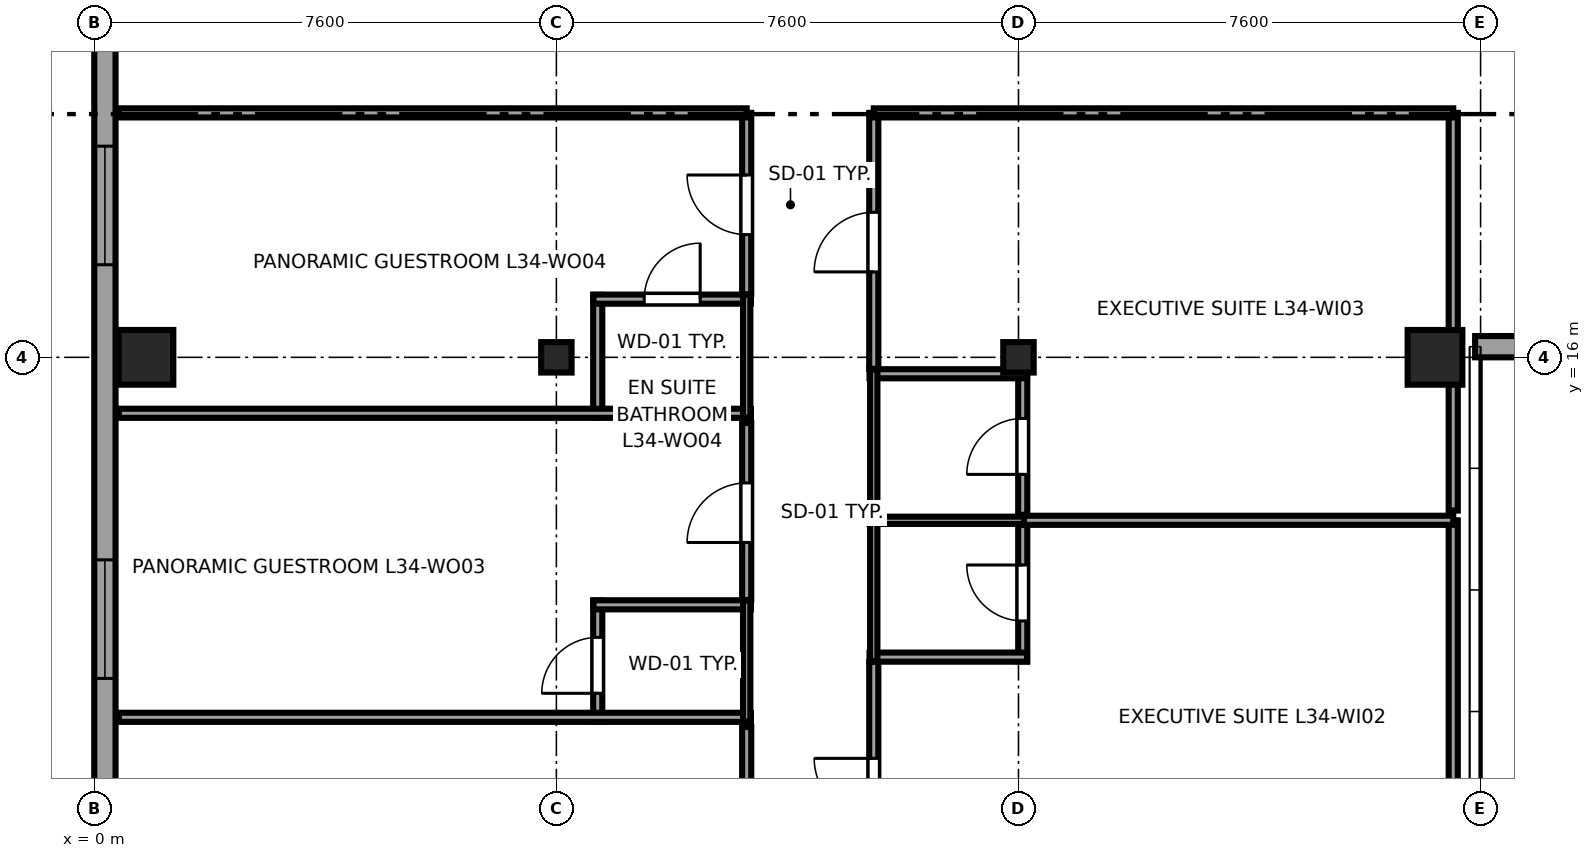
"""IFC4 building model, lengths in metres.
Left out: names, types, materials, properties, quantities, classifications, styles, units other than length and angle.
Written with IfcOpenShell. Run it as: python <this file> out.ifc"""

import sys

from ifc_helpers import new_model, si_unit, direction, frame, frame_2d, origin, origin_2d, place, context, subcontext, project, spatial, rectangle, i_section, extrude, source, transform, mapped, element, fill, save


model = new_model("IFC4")
c1 = context("Model", 3, precision=1e-05, world=origin(), true_north=direction((0.0, 1.0)))
c2 = subcontext(c1, "Body", "Model", "MODEL_VIEW")
j1 = project(units=[si_unit("LENGTHUNIT", "METRE"), si_unit("PLANEANGLEUNIT", "RADIAN")], contexts=[c1])
p1 = place(None, origin())
s1 = spatial("IfcSite", under=j1, at=p1, CompositionType="ELEMENT")
p2 = place(p1, origin())
s2 = spatial("IfcBuilding", under=s1, at=p2, CompositionType="ELEMENT")
p3 = place(p2, frame((0.0, 0.0, 132.85)))
s3 = spatial("IfcBuildingStorey", under=s2, at=p3, CompositionType="ELEMENT", Elevation=132.85)
m1 = source(origin(), c2, "Body", "SweptSolid", [
    extrude(rectangle(XDim=0.9, YDim=0.9, at=origin_2d()), origin(), (0.0, 0.0, 1.0), 3.55),
])
p4 = place(p3, frame((0.85, 16.0, 0.0), z_axis=(0.0, 0.0, 1.0), x_axis=(1.0, 0.0, 0.0)))
e1 = element("IfcColumn", 1, at=p4, inside=s3, PredefinedType="COLUMN", context=c2, shape_type="MappedRepresentation", body=[
    mapped(m1, transform((0.0, 0.0, 0.0), x_axis=(1.0, 0.0, 0.0), y_axis=(0.0, 1.0, 0.0), z_axis=(0.0, 0.0, 1.0), scale=1.0)),
])
m2 = source(origin(), c2, "Body", "SweptSolid", [
    extrude(i_section(OverallWidth=0.5, OverallDepth=0.5, WebThickness=0.022, FlangeThickness=0.034, at=origin_2d()), origin(), (0.0, 0.0, 1.0), 3.55),
])
for number, where, z_axis, x_axis in (
    (2, (7.6, 16.0, 0.0), (0.0, 0.0, 1.0), (1.0, 0.0, 0.0)),
    (3, (15.2, 16.0, 0.0), (0.0, 0.0, 1.0), (1.0, 0.0, 0.0)),
):
    element("IfcColumn", number, at=place(p3, frame(where, z_axis=z_axis, x_axis=x_axis)), inside=s3, PredefinedType="COLUMN", context=c2, shape_type="MappedRepresentation", body=[
        mapped(m2, transform((0.0, 0.0, 0.0), x_axis=(1.0, 0.0, 0.0), y_axis=(0.0, 1.0, 0.0), z_axis=(0.0, 0.0, 1.0), scale=1.0)),
    ])
p5 = place(p3, frame((22.05, 16.0, 0.0), z_axis=(0.0, 0.0, 1.0), x_axis=(1.0, 0.0, 0.0)))
e4 = element("IfcColumn", 4, at=p5, inside=s3, PredefinedType="COLUMN", context=c2, shape_type="MappedRepresentation", body=[
    mapped(m1, transform((0.0, 0.0, 0.0), x_axis=(1.0, 0.0, 0.0), y_axis=(0.0, 1.0, 0.0), z_axis=(0.0, 0.0, 1.0), scale=1.0)),
])
p6 = place(p3, frame((22.71, 16.175, 0.0), z_axis=(0.0, 0.0, 1.0), x_axis=(1.0, 0.0, 0.0)))
e5 = element("IfcWall", 5, at=p6, inside=s3, PredefinedType="SOLIDWALL", context=c2, shape_type="SweptSolid", body=[
    extrude(rectangle(XDim=11.58, YDim=0.35, at=frame_2d((5.79, 0.0))), origin(), (0.0, 0.0, 1.0), 2.748),
])
p7 = place(p6, frame((2.22, 0.0, 0.68)))
e6 = element("IfcOpeningElement", 6, at=p7, cuts=e5, PredefinedType="OPENING", context=c2, shape_type="SweptSolid", body=[
    extrude(rectangle(XDim=1.95, YDim=1.82, at=frame_2d((0.975, 0.91))), frame((0.0, 0.185, 0.0), z_axis=(0.0, -1.0, 0.0), x_axis=(1.0, 0.0, 0.0)), (0.0, 0.0, 1.0), 0.37),
])
p8 = place(p6, frame((7.41, 0.0, 0.68)))
e7 = element("IfcOpeningElement", 7, at=p8, cuts=e5, PredefinedType="OPENING", context=c2, shape_type="SweptSolid", body=[
    extrude(rectangle(XDim=1.95, YDim=1.82, at=frame_2d((0.975, 0.91))), frame((0.0, 0.185, 0.0), z_axis=(0.0, -1.0, 0.0), x_axis=(1.0, 0.0, 0.0)), (0.0, 0.0, 1.0), 0.37),
])
p9 = place(p3, frame((0.175, 41.383, 0.0), z_axis=(0.0, 0.0, 1.0), x_axis=(0.0, -1.0, 0.0)))
e8 = element("IfcWall", 8, at=p9, inside=s3, PredefinedType="SOLIDWALL", context=c2, shape_type="SweptSolid", body=[
    extrude(rectangle(XDim=36.766, YDim=0.35, at=frame_2d((18.383, 0.0))), origin(), (0.0, 0.0, 1.0), 3.37),
])
p10 = place(p9, frame((0.551, 0.0, 0.68)))
e9 = element("IfcOpeningElement", 9, at=p10, cuts=e8, PredefinedType="OPENING", context=c2, shape_type="SweptSolid", body=[
    extrude(rectangle(XDim=1.95, YDim=1.82, at=frame_2d((0.975, 0.91))), frame((0.0, 0.185, 0.0), z_axis=(0.0, -1.0, 0.0), x_axis=(1.0, 0.0, 0.0)), (0.0, 0.0, 1.0), 0.37),
])
p11 = place(p9, frame((9.504, 0.0, 0.68)))
e10 = element("IfcOpeningElement", 10, at=p11, cuts=e8, PredefinedType="OPENING", context=c2, shape_type="SweptSolid", body=[
    extrude(rectangle(XDim=1.95, YDim=1.82, at=frame_2d((0.975, 0.91))), frame((0.0, 0.185, 0.0), z_axis=(0.0, -1.0, 0.0), x_axis=(1.0, 0.0, 0.0)), (0.0, 0.0, 1.0), 0.37),
])
p12 = place(p9, frame((13.456, 0.0, 0.68)))
e11 = element("IfcOpeningElement", 11, at=p12, cuts=e8, PredefinedType="OPENING", context=c2, shape_type="SweptSolid", body=[
    extrude(rectangle(XDim=1.95, YDim=1.82, at=frame_2d((0.975, 0.91))), frame((0.0, 0.185, 0.0), z_axis=(0.0, -1.0, 0.0), x_axis=(1.0, 0.0, 0.0)), (0.0, 0.0, 1.0), 0.37),
])
p13 = place(p9, frame((21.91, 0.0, 0.68)))
e12 = element("IfcOpeningElement", 12, at=p13, cuts=e8, PredefinedType="OPENING", context=c2, shape_type="SweptSolid", body=[
    extrude(rectangle(XDim=1.95, YDim=1.82, at=frame_2d((0.975, 0.91))), frame((0.0, 0.185, 0.0), z_axis=(0.0, -1.0, 0.0), x_axis=(1.0, 0.0, 0.0)), (0.0, 0.0, 1.0), 0.37),
])
p14 = place(p9, frame((28.713, 0.0, 0.68)))
e13 = element("IfcOpeningElement", 13, at=p14, cuts=e8, PredefinedType="OPENING", context=c2, shape_type="SweptSolid", body=[
    extrude(rectangle(XDim=1.95, YDim=1.82, at=frame_2d((0.975, 0.91))), frame((0.0, 0.185, 0.0), z_axis=(0.0, -1.0, 0.0), x_axis=(1.0, 0.0, 0.0)), (0.0, 0.0, 1.0), 0.37),
])
p15 = place(p9, frame((33.183, 0.0, 0.62)))
e14 = element("IfcOpeningElement", 14, at=p15, cuts=e8, PredefinedType="OPENING", context=c2, shape_type="SweptSolid", body=[
    extrude(rectangle(XDim=1.5, YDim=1.55, at=frame_2d((0.75, 0.775))), frame((0.0, 0.185, 0.0), z_axis=(0.0, -1.0, 0.0), x_axis=(1.0, 0.0, 0.0)), (0.0, 0.0, 1.0), 0.37),
])
p16 = place(p3, frame((8.28, 10.01, 0.0), z_axis=(0.0, 0.0, 1.0), x_axis=(0.0, 1.0, 0.0)))
e15 = element("IfcWall", 15, at=p16, inside=s3, PredefinedType="PARTITIONING", context=c2, shape_type="SweptSolid", body=[
    extrude(rectangle(XDim=1.99, YDim=0.15, at=frame_2d((0.995, 0.0))), origin(), (0.0, 0.0, 1.0), 3.37),
])
p17 = place(p16, frame((0.465, 0.0, 0.0)))
e16 = element("IfcOpeningElement", 16, at=p17, cuts=e15, PredefinedType="OPENING", context=c2, shape_type="SweptSolid", body=[
    extrude(rectangle(XDim=0.92, YDim=2.01, at=frame_2d((0.46, 1.005))), frame((0.0, 0.085, 0.0), z_axis=(0.0, -1.0, 0.0), x_axis=(1.0, 0.0, 0.0)), (0.0, 0.0, 1.0), 0.17),
])
p18 = place(p3, frame((0.405, 10.08, 0.0), z_axis=(0.0, 0.0, 1.0), x_axis=(1.0, 0.0, 0.0)))
e17 = element("IfcWall", 17, at=p18, inside=s3, PredefinedType="PARTITIONING", context=c2, shape_type="SweptSolid", body=[
    extrude(rectangle(XDim=10.395, YDim=0.15, at=frame_2d((5.198, 0.0))), origin(), (0.0, 0.0, 1.0), 3.37),
])
p19 = place(p3, frame((8.21, 11.93, 0.0), z_axis=(0.0, 0.0, 1.0), x_axis=(1.0, 0.0, 0.0)))
e18 = element("IfcWall", 18, at=p19, inside=s3, PredefinedType="PARTITIONING", context=c2, shape_type="SweptSolid", body=[
    extrude(rectangle(XDim=2.59, YDim=0.15, at=frame_2d((1.295, 0.0))), origin(), (0.0, 0.0, 1.0), 3.37),
])
p20 = place(p3, frame((10.73, 10.01, 0.0), z_axis=(0.0, 0.0, 1.0), x_axis=(0.0, 1.0, 0.0)))
e19 = element("IfcWall", 19, at=p20, inside=s3, PredefinedType="PLUMBINGWALL", context=c2, shape_type="SweptSolid", body=[
    extrude(rectangle(XDim=1.99, YDim=0.12, at=frame_2d((0.995, 0.0))), origin(), (0.0, 0.0, 1.0), 3.37),
])
p21 = place(p3, frame((8.28, 15.01, 0.0), z_axis=(0.0, 0.0, 1.0), x_axis=(0.0, 1.0, 0.0)))
e20 = element("IfcWall", 20, at=p21, inside=s3, PredefinedType="PARTITIONING", context=c2, shape_type="SweptSolid", body=[
    extrude(rectangle(XDim=2.017, YDim=0.15, at=frame_2d((1.009, 0.0))), origin(), (0.0, 0.0, 1.0), 3.37),
])
p22 = place(p3, frame((0.405, 15.08, 0.0), z_axis=(0.0, 0.0, 1.0), x_axis=(1.0, 0.0, 0.0)))
e21 = element("IfcWall", 21, at=p22, inside=s3, PredefinedType="PARTITIONING", context=c2, shape_type="SweptSolid", body=[
    extrude(rectangle(XDim=10.395, YDim=0.15, at=frame_2d((5.198, 0.0))), origin(), (0.0, 0.0, 1.0), 3.37),
])
p23 = place(p3, frame((8.21, 16.957, 0.0), z_axis=(0.0, 0.0, 1.0), x_axis=(1.0, 0.0, 0.0)))
e22 = element("IfcWall", 22, at=p23, inside=s3, PredefinedType="PARTITIONING", context=c2, shape_type="SweptSolid", body=[
    extrude(rectangle(XDim=2.59, YDim=0.15, at=frame_2d((1.295, 0.0))), origin(), (0.0, 0.0, 1.0), 3.37),
])
p24 = place(p23, frame((0.835, 0.0, 0.0)))
e23 = element("IfcOpeningElement", 23, at=p24, cuts=e22, PredefinedType="OPENING", context=c2, shape_type="SweptSolid", body=[
    extrude(rectangle(XDim=0.92, YDim=2.01, at=frame_2d((0.46, 1.005))), frame((0.0, 0.085, 0.0), z_axis=(0.0, -1.0, 0.0), x_axis=(1.0, 0.0, 0.0)), (0.0, 0.0, 1.0), 0.17),
])
p25 = place(p3, frame((10.73, 15.01, 0.0), z_axis=(0.0, 0.0, 1.0), x_axis=(0.0, 1.0, 0.0)))
e24 = element("IfcWall", 24, at=p25, inside=s3, PredefinedType="PLUMBINGWALL", context=c2, shape_type="SweptSolid", body=[
    extrude(rectangle(XDim=2.017, YDim=0.12, at=frame_2d((1.009, 0.0))), origin(), (0.0, 0.0, 1.0), 3.37),
])
p26 = place(p3, frame((15.27, 11.0, 0.0), z_axis=(0.0, 0.0, 1.0), x_axis=(0.0, 1.0, 0.0)))
e25 = element("IfcWall", 25, at=p26, inside=s3, PredefinedType="PARTITIONING", context=c2, shape_type="SweptSolid", body=[
    extrude(rectangle(XDim=2.39, YDim=0.15, at=frame_2d((1.195, 0.0))), origin(), (0.0, 0.0, 1.0), 2.827),
])
p27 = place(p26, frame((0.665, 0.0, 0.0)))
e26 = element("IfcOpeningElement", 26, at=p27, cuts=e25, PredefinedType="OPENING", context=c2, shape_type="SweptSolid", body=[
    extrude(rectangle(XDim=0.92, YDim=2.01, at=frame_2d((0.46, 1.005))), frame((0.0, 0.085, 0.0), z_axis=(0.0, -1.0, 0.0), x_axis=(1.0, 0.0, 0.0)), (0.0, 0.0, 1.0), 0.17),
])
p28 = place(p3, frame((12.75, 11.07, 0.0), z_axis=(0.0, 0.0, 1.0), x_axis=(1.0, 0.0, 0.0)))
e27 = element("IfcWall", 27, at=p28, inside=s3, PredefinedType="PARTITIONING", context=c2, shape_type="SweptSolid", body=[
    extrude(rectangle(XDim=2.59, YDim=0.15, at=frame_2d((1.295, 0.0))), origin(), (0.0, 0.0, 1.0), 3.37),
])
p29 = place(p3, frame((12.75, 13.32, 0.0), z_axis=(0.0, 0.0, 1.0), x_axis=(1.0, 0.0, 0.0)))
e28 = element("IfcWall", 28, at=p29, inside=s3, PredefinedType="PLUMBINGWALL", context=c2, shape_type="SweptSolid", body=[
    extrude(rectangle(XDim=2.59, YDim=0.12, at=frame_2d((1.295, 0.0))), origin(), (0.0, 0.0, 1.0), 3.37),
])
p30 = place(p3, frame((12.82, 11.0, 0.0), z_axis=(0.0, 0.0, 1.0), x_axis=(0.0, 1.0, 0.0)))
e29 = element("IfcWall", 29, at=p30, inside=s3, PredefinedType="PLUMBINGWALL", context=c2, shape_type="SweptSolid", body=[
    extrude(rectangle(XDim=2.39, YDim=0.12, at=frame_2d((1.195, 0.0))), origin(), (0.0, 0.0, 1.0), 3.37),
])
p31 = place(p3, frame((15.27, 13.41, 0.0), z_axis=(0.0, 0.0, 1.0), x_axis=(0.0, 1.0, 0.0)))
e30 = element("IfcWall", 30, at=p31, inside=s3, PredefinedType="PARTITIONING", context=c2, shape_type="SweptSolid", body=[
    extrude(rectangle(XDim=2.39, YDim=0.15, at=frame_2d((1.195, 0.0))), origin(), (0.0, 0.0, 1.0), 2.827),
])
p32 = place(p31, frame((0.665, 0.0, 0.0)))
e31 = element("IfcOpeningElement", 31, at=p32, cuts=e30, PredefinedType="OPENING", context=c2, shape_type="SweptSolid", body=[
    extrude(rectangle(XDim=0.92, YDim=2.01, at=frame_2d((0.46, 1.005))), frame((0.0, 0.085, 0.0), z_axis=(0.0, -1.0, 0.0), x_axis=(1.0, 0.0, 0.0)), (0.0, 0.0, 1.0), 0.17),
])
p33 = place(p3, frame((12.75, 15.73, 0.0), z_axis=(0.0, 0.0, 1.0), x_axis=(1.0, 0.0, 0.0)))
e32 = element("IfcWall", 32, at=p33, inside=s3, PredefinedType="PARTITIONING", context=c2, shape_type="SweptSolid", body=[
    extrude(rectangle(XDim=2.59, YDim=0.15, at=frame_2d((1.295, 0.0))), origin(), (0.0, 0.0, 1.0), 3.37),
])
p34 = place(p3, frame((12.82, 13.41, 0.0), z_axis=(0.0, 0.0, 1.0), x_axis=(0.0, 1.0, 0.0)))
e33 = element("IfcWall", 33, at=p34, inside=s3, PredefinedType="PLUMBINGWALL", context=c2, shape_type="SweptSolid", body=[
    extrude(rectangle(XDim=2.39, YDim=0.12, at=frame_2d((1.195, 0.0))), origin(), (0.0, 0.0, 1.0), 3.37),
])
p35 = place(p3, frame((10.73, 6.937, 0.0), z_axis=(0.0, 0.0, 1.0), x_axis=(0.0, 1.0, 0.0)))
e34 = element("IfcWall", 34, at=p35, inside=s3, PredefinedType="PARTITIONING", context=c2, shape_type="SweptSolid", body=[
    extrude(rectangle(XDim=2.983, YDim=0.15, at=frame_2d((1.491, 0.0))), origin(), (0.0, 0.0, 1.0), 3.37),
])
p36 = place(p35, frame((0.981, 0.0, 0.0)))
e35 = element("IfcOpeningElement", 35, at=p36, cuts=e34, PredefinedType="OPENING", context=c2, shape_type="SweptSolid", body=[
    extrude(rectangle(XDim=0.98, YDim=2.12, at=frame_2d((0.49, 1.06))), frame((0.0, 0.085, 0.0), z_axis=(0.0, -1.0, 0.0), x_axis=(1.0, 0.0, 0.0)), (0.0, 0.0, 1.0), 0.17),
])
p37 = place(p3, frame((10.73, 12.01, 0.0), z_axis=(0.0, 0.0, 1.0), x_axis=(0.0, 1.0, 0.0)))
e36 = element("IfcWall", 36, at=p37, inside=s3, PredefinedType="PARTITIONING", context=c2, shape_type="SweptSolid", body=[
    extrude(rectangle(XDim=2.91, YDim=0.15, at=frame_2d((1.455, 0.0))), origin(), (0.0, 0.0, 1.0), 3.37),
])
p38 = place(p37, frame((0.945, 0.0, 0.0)))
e37 = element("IfcOpeningElement", 37, at=p38, cuts=e36, PredefinedType="OPENING", context=c2, shape_type="SweptSolid", body=[
    extrude(rectangle(XDim=0.98, YDim=2.12, at=frame_2d((0.49, 1.06))), frame((0.0, 0.085, 0.0), z_axis=(0.0, -1.0, 0.0), x_axis=(1.0, 0.0, 0.0)), (0.0, 0.0, 1.0), 0.17),
])
p39 = place(p3, frame((10.73, 17.037, 0.0), z_axis=(0.0, 0.0, 1.0), x_axis=(0.0, 1.0, 0.0)))
e38 = element("IfcWall", 38, at=p39, inside=s3, PredefinedType="PARTITIONING", context=c2, shape_type="SweptSolid", body=[
    extrude(rectangle(XDim=2.983, YDim=0.15, at=frame_2d((1.491, 0.0))), origin(), (0.0, 0.0, 1.0), 3.37),
])
p40 = place(p39, frame((0.981, 0.0, 0.0)))
e39 = element("IfcOpeningElement", 39, at=p40, cuts=e38, PredefinedType="OPENING", context=c2, shape_type="SweptSolid", body=[
    extrude(rectangle(XDim=0.98, YDim=2.12, at=frame_2d((0.49, 1.06))), frame((0.0, 0.085, 0.0), z_axis=(0.0, -1.0, 0.0), x_axis=(1.0, 0.0, 0.0)), (0.0, 0.0, 1.0), 0.17),
])
p41 = place(p3, frame((0.405, 20.02, 0.0), z_axis=(0.0, 0.0, 1.0), x_axis=(1.0, 0.0, 0.0)))
e40 = element("IfcWall", 40, at=p41, inside=s3, PredefinedType="PARTITIONING", context=c2, shape_type="SweptSolid", body=[
    extrude(rectangle(XDim=10.325, YDim=0.15, at=frame_2d((5.163, 0.0))), origin(), (0.0, 0.0, 1.0), 3.37),
])
p42 = place(p3, frame((12.82, 6.88, 0.0), z_axis=(0.0, 0.0, 1.0), x_axis=(0.0, 1.0, 0.0)))
e41 = element("IfcWall", 41, at=p42, inside=s3, PredefinedType="PARTITIONING", context=c2, shape_type="SweptSolid", body=[
    extrude(rectangle(XDim=4.11, YDim=0.15, at=frame_2d((2.055, 0.0))), origin(), (0.0, 0.0, 1.0), 3.37),
])
p43 = place(p42, frame((1.545, 0.0, 0.0)))
e42 = element("IfcOpeningElement", 42, at=p43, cuts=e41, PredefinedType="OPENING", context=c2, shape_type="SweptSolid", body=[
    extrude(rectangle(XDim=0.98, YDim=2.12, at=frame_2d((0.49, 1.06))), frame((0.0, 0.085, 0.0), z_axis=(0.0, -1.0, 0.0), x_axis=(1.0, 0.0, 0.0)), (0.0, 0.0, 1.0), 0.17),
])
p44 = place(p3, frame((22.35, 6.88, 0.0), z_axis=(0.0, 0.0, 1.0), x_axis=(0.0, 1.0, 0.0)))
e43 = element("IfcWall", 43, at=p44, inside=s3, PredefinedType="PARTITIONING", context=c2, shape_type="SweptSolid", body=[
    extrude(rectangle(XDim=6.44, YDim=0.15, at=frame_2d((3.22, 0.0))), origin(), (0.0, 0.0, 1.0), 3.37),
])
p45 = place(p3, frame((15.29, 13.32, 0.0), z_axis=(0.0, 0.0, 1.0), x_axis=(1.0, 0.0, 0.0)))
e44 = element("IfcWall", 44, at=p45, inside=s3, PredefinedType="PARTITIONING", context=c2, shape_type="SweptSolid", body=[
    extrude(rectangle(XDim=7.06, YDim=0.15, at=frame_2d((3.53, 0.0))), origin(), (0.0, 0.0, 1.0), 3.37),
])
p46 = place(p3, frame((12.82, 15.81, 0.0), z_axis=(0.0, 0.0, 1.0), x_axis=(0.0, 1.0, 0.0)))
e45 = element("IfcWall", 45, at=p46, inside=s3, PredefinedType="PARTITIONING", context=c2, shape_type="SweptSolid", body=[
    extrude(rectangle(XDim=4.21, YDim=0.15, at=frame_2d((2.105, 0.0))), origin(), (0.0, 0.0, 1.0), 3.37),
])
p47 = place(p46, frame((1.595, 0.0, 0.0)))
e46 = element("IfcOpeningElement", 46, at=p47, cuts=e45, PredefinedType="OPENING", context=c2, shape_type="SweptSolid", body=[
    extrude(rectangle(XDim=0.98, YDim=2.12, at=frame_2d((0.49, 1.06))), frame((0.0, 0.085, 0.0), z_axis=(0.0, -1.0, 0.0), x_axis=(1.0, 0.0, 0.0)), (0.0, 0.0, 1.0), 0.17),
])
p48 = place(p3, frame((22.35, 13.48, 0.0), z_axis=(0.0, 0.0, 1.0), x_axis=(0.0, 1.0, 0.0)))
e47 = element("IfcWall", 47, at=p48, inside=s3, PredefinedType="PARTITIONING", context=c2, shape_type="SweptSolid", body=[
    extrude(rectangle(XDim=6.54, YDim=0.15, at=frame_2d((3.27, 0.0))), origin(), (0.0, 0.0, 1.0), 3.37),
])
p49 = place(p3, frame((12.82, 20.02, 0.0), z_axis=(0.0, 0.0, 1.0), x_axis=(1.0, 0.0, 0.0)))
e48 = element("IfcWall", 48, at=p49, inside=s3, PredefinedType="PARTITIONING", context=c2, shape_type="SweptSolid", body=[
    extrude(rectangle(XDim=9.53, YDim=0.15, at=frame_2d((4.765, 0.0))), origin(), (0.0, 0.0, 1.0), 2.954),
])
m3 = source(origin(), c2, "Body", "SweptSolid", [
    extrude(rectangle(XDim=1.95, YDim=1.82, at=frame_2d((0.975, 0.91))), frame((0.0, 0.09, 0.0), z_axis=(0.0, -1.0, 0.0), x_axis=(1.0, 0.0, 0.0)), (0.0, 0.0, 1.0), 0.06),
])
p50 = place(p13, origin())
e49 = element("IfcWindow", 49, at=p50, inside=s3, PartitioningType="DOUBLE_PANEL_VERTICAL", PredefinedType="WINDOW", context=c2, shape_type="MappedRepresentation", body=[
    mapped(m3, transform((0.0, 0.0, 0.0), x_axis=(1.0, 0.0, 0.0), y_axis=(0.0, 1.0, 0.0), z_axis=(0.0, 0.0, 1.0), scale=1.0)),
])
fill(e12, e49)
p51 = place(p14, origin())
e50 = element("IfcWindow", 50, at=p51, inside=s3, PartitioningType="DOUBLE_PANEL_VERTICAL", PredefinedType="WINDOW", context=c2, shape_type="MappedRepresentation", body=[
    mapped(m3, transform((0.0, 0.0, 0.0), x_axis=(1.0, 0.0, 0.0), y_axis=(0.0, 1.0, 0.0), z_axis=(0.0, 0.0, 1.0), scale=1.0)),
])
fill(e13, e50)
m4 = source(origin(), c2, "Body", "SweptSolid", [
    extrude(rectangle(XDim=0.92, YDim=2.01, at=frame_2d((0.46, 1.005))), frame((0.0, 0.025, 0.0), z_axis=(0.0, -1.0, 0.0), x_axis=(1.0, 0.0, 0.0)), (0.0, 0.0, 1.0), 0.05),
])
p52 = place(p17, origin())
e51 = element("IfcDoor", 51, at=p52, inside=s3, OperationType="SINGLE_SWING_LEFT", PredefinedType="DOOR", context=c2, shape_type="MappedRepresentation", body=[
    mapped(m4, transform((0.0, 0.0, 0.0), x_axis=(1.0, 0.0, 0.0), y_axis=(0.0, 1.0, 0.0), z_axis=(0.0, 0.0, 1.0), scale=1.0)),
])
fill(e16, e51)
p53 = place(p24, origin())
e52 = element("IfcDoor", 52, at=p53, inside=s3, OperationType="SINGLE_SWING_RIGHT", PredefinedType="DOOR", context=c2, shape_type="MappedRepresentation", body=[
    mapped(m4, transform((0.0, 0.0, 0.0), x_axis=(1.0, 0.0, 0.0), y_axis=(0.0, 1.0, 0.0), z_axis=(0.0, 0.0, 1.0), scale=1.0)),
])
fill(e23, e52)
p54 = place(p27, origin())
e53 = element("IfcDoor", 53, at=p54, inside=s3, OperationType="SINGLE_SWING_RIGHT", PredefinedType="DOOR", context=c2, shape_type="MappedRepresentation", body=[
    mapped(m4, transform((0.0, 0.0, 0.0), x_axis=(1.0, 0.0, 0.0), y_axis=(0.0, 1.0, 0.0), z_axis=(0.0, 0.0, 1.0), scale=1.0)),
])
fill(e26, e53)
p55 = place(p32, origin())
e54 = element("IfcDoor", 54, at=p55, inside=s3, OperationType="SINGLE_SWING_LEFT", PredefinedType="DOOR", context=c2, shape_type="MappedRepresentation", body=[
    mapped(m4, transform((0.0, 0.0, 0.0), x_axis=(1.0, 0.0, 0.0), y_axis=(0.0, 1.0, 0.0), z_axis=(0.0, 0.0, 1.0), scale=1.0)),
])
fill(e31, e54)
m5 = source(origin(), c2, "Body", "SweptSolid", [
    extrude(rectangle(XDim=0.98, YDim=2.12, at=frame_2d((0.49, 1.06))), frame((0.0, 0.025, 0.0), z_axis=(0.0, -1.0, 0.0), x_axis=(1.0, 0.0, 0.0)), (0.0, 0.0, 1.0), 0.05),
])
p56 = place(p38, origin())
e55 = element("IfcDoor", 55, at=p56, inside=s3, OperationType="SINGLE_SWING_LEFT", PredefinedType="DOOR", context=c2, shape_type="MappedRepresentation", body=[
    mapped(m5, transform((0.0, 0.0, 0.0), x_axis=(1.0, 0.0, 0.0), y_axis=(0.0, 1.0, 0.0), z_axis=(0.0, 0.0, 1.0), scale=1.0)),
])
fill(e37, e55)
p57 = place(p40, origin())
e56 = element("IfcDoor", 56, at=p57, inside=s3, OperationType="SINGLE_SWING_RIGHT", PredefinedType="DOOR", context=c2, shape_type="MappedRepresentation", body=[
    mapped(m5, transform((0.0, 0.0, 0.0), x_axis=(1.0, 0.0, 0.0), y_axis=(0.0, 1.0, 0.0), z_axis=(0.0, 0.0, 1.0), scale=1.0)),
])
fill(e39, e56)
p58 = place(p43, origin())
e57 = element("IfcDoor", 57, at=p58, inside=s3, OperationType="SINGLE_SWING_RIGHT", PredefinedType="DOOR", context=c2, shape_type="MappedRepresentation", body=[
    mapped(m5, transform((0.0, 0.0, 0.0), x_axis=(1.0, 0.0, 0.0), y_axis=(0.0, 1.0, 0.0), z_axis=(0.0, 0.0, 1.0), scale=1.0)),
])
fill(e42, e57)
p59 = place(p47, origin())
e58 = element("IfcDoor", 58, at=p59, inside=s3, OperationType="SINGLE_SWING_LEFT", PredefinedType="DOOR", context=c2, shape_type="MappedRepresentation", body=[
    mapped(m5, transform((0.0, 0.0, 0.0), x_axis=(1.0, 0.0, 0.0), y_axis=(0.0, 1.0, 0.0), z_axis=(0.0, 0.0, 1.0), scale=1.0)),
])
fill(e46, e58)
save(model, sys.argv[1])
